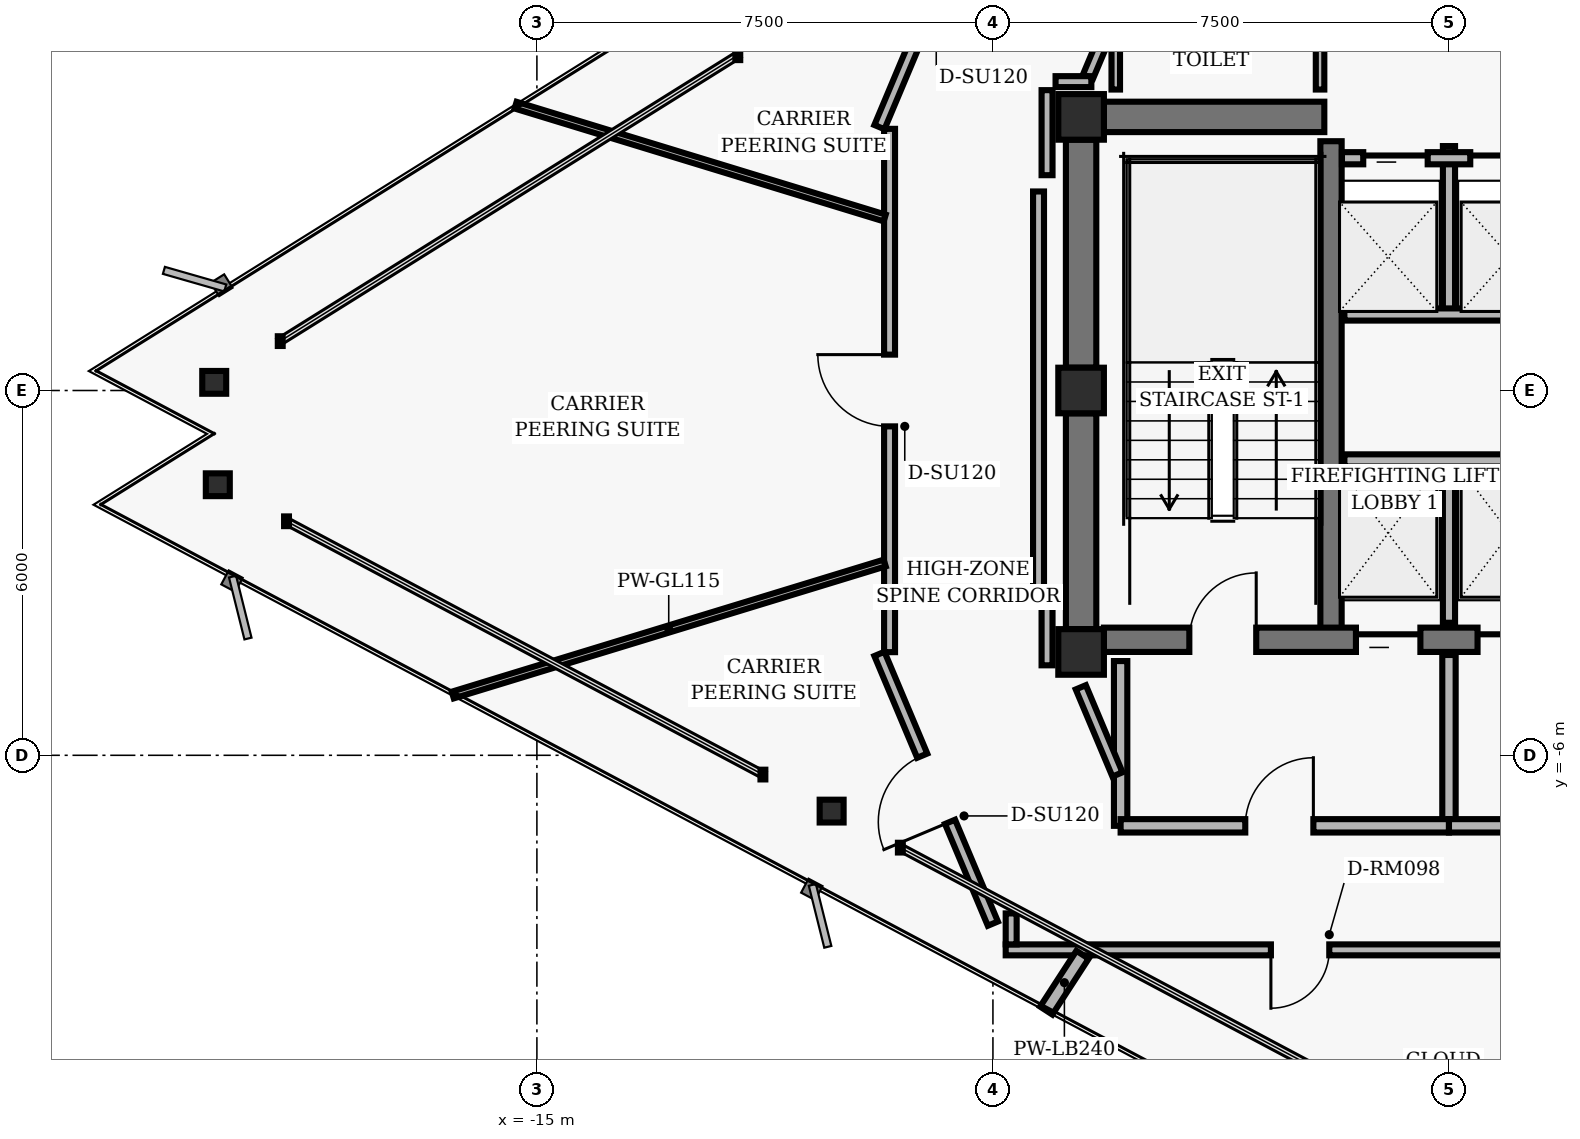
"""IFC4 building model, lengths in metres.
Left out: names, types, materials, properties, quantities, classifications, styles, units other than length and angle.
Written with IfcOpenShell. Run it as: python <this file> out.ifc"""

import sys

from ifc_helpers import new_model, si_unit, direction, frame, frame_2d, origin, origin_2d, place, context, subcontext, project, spatial, rectangle, hollow_rectangle, i_section, extrude, element, fill, save


model = new_model("IFC4")
c1 = context("Model", 3, precision=1e-05, world=origin(), true_north=direction((0.0, 1.0)))
c2 = subcontext(c1, "Body", "Model", "MODEL_VIEW")
j1 = project(units=[si_unit("LENGTHUNIT", "METRE"), si_unit("PLANEANGLEUNIT", "RADIAN")], contexts=[c1])
p1 = place(None, origin())
s1 = spatial("IfcSite", under=j1, at=p1, CompositionType="ELEMENT")
p2 = place(p1, origin())
s2 = spatial("IfcBuilding", under=s1, at=p2, CompositionType="ELEMENT")
p3 = place(p2, frame((0.0, 0.0, 211.84)))
s3 = spatial("IfcBuildingStorey", under=s2, at=p3, CompositionType="ELEMENT", Elevation=211.84)
for number, where, z_axis, x_axis in (
    (1, (-6.05, 4.5, 0.0), (0.0, 0.0, 1.0), (1.0, 0.0, 0.0)),
    (2, (-6.05, 0.0, 0.0), (0.0, 0.0, 1.0), (1.0, 0.0, 0.0)),
    (3, (-6.05, -4.3, 0.0), (0.0, 0.0, 1.0), (1.0, 0.0, 0.0)),
):
    element("IfcColumn", number, at=place(p3, frame(where, z_axis=z_axis, x_axis=x_axis)), inside=s3, PredefinedType="COLUMN", context=c2, shape_type="SweptSolid", body=[
        extrude(hollow_rectangle(XDim=0.75, YDim=0.75, WallThickness=0.05, InnerFilletRadius=0.02, OuterFilletRadius=0.04, at=origin_2d()), origin(), (0.0, 0.0, 1.0), 3.04),
    ])
p4 = place(p3, frame((-6.05, 0.375, 0.0), z_axis=(0.0, 0.0, 1.0), x_axis=(0.0, 1.0, 0.0)))
e4 = element("IfcWall", 4, at=p4, inside=s3, PredefinedType="SHEAR", context=c2, shape_type="SweptSolid", body=[
    extrude(rectangle(XDim=3.75, YDim=0.5, at=frame_2d((1.875, 0.0))), origin(), (0.0, 0.0, 1.0), 2.618),
])
p5 = place(p3, frame((-6.05, -3.925, 0.0), z_axis=(0.0, 0.0, 1.0), x_axis=(0.0, 1.0, 0.0)))
e5 = element("IfcWall", 5, at=p5, inside=s3, PredefinedType="SHEAR", context=c2, shape_type="SweptSolid", body=[
    extrude(rectangle(XDim=3.55, YDim=0.5, at=frame_2d((1.775, 0.0))), origin(), (0.0, 0.0, 1.0), 2.618),
])
p6 = place(p3, frame((-1.94, -4.1, 0.0), z_axis=(0.0, 0.0, 1.0), x_axis=(0.0, 1.0, 0.0)))
e6 = element("IfcWall", 6, at=p6, inside=s3, PredefinedType="SHEAR", context=c2, shape_type="SweptSolid", body=[
    extrude(rectangle(XDim=8.2, YDim=0.35, at=frame_2d((4.1, 0.0))), origin(), (0.0, 0.0, 1.0), 2.618),
])
p7 = place(p3, frame((-5.675, -4.1, 0.0), z_axis=(0.0, 0.0, 1.0), x_axis=(1.0, 0.0, 0.0)))
e7 = element("IfcWall", 7, at=p7, inside=s3, PredefinedType="SHEAR", context=c2, shape_type="SweptSolid", body=[
    extrude(rectangle(XDim=11.35, YDim=0.4, at=frame_2d((5.675, 0.0))), origin(), (0.0, 0.0, 1.0), 2.618),
])
p8 = place(p7, frame((1.405, 0.0, 0.0)))
e8 = element("IfcOpeningElement", 8, at=p8, cuts=e7, PredefinedType="OPENING", context=c2, shape_type="SweptSolid", body=[
    extrude(rectangle(XDim=1.1, YDim=2.04, at=frame_2d((0.55, 1.02))), frame((0.0, 0.21, 0.0), z_axis=(0.0, -1.0, 0.0), x_axis=(1.0, 0.0, 0.0)), (0.0, 0.0, 1.0), 0.42),
])
p9 = place(p7, frame((8.845, 0.0, 0.0)))
e9 = element("IfcOpeningElement", 9, at=p9, cuts=e7, PredefinedType="OPENING", context=c2, shape_type="SweptSolid", body=[
    extrude(rectangle(XDim=1.1, YDim=2.04, at=frame_2d((0.55, 1.02))), frame((0.0, 0.21, 0.0), z_axis=(0.0, -1.0, 0.0), x_axis=(1.0, 0.0, 0.0)), (0.0, 0.0, 1.0), 0.42),
])
p10 = place(p7, frame((4.145, 0.0, 0.0)))
e10 = element("IfcOpeningElement", 10, at=p10, cuts=e7, PredefinedType="OPENING", context=c2, shape_type="SweptSolid", body=[
    extrude(rectangle(XDim=1.06, YDim=2.04, at=frame_2d((0.53, 1.02))), frame((0.0, 0.21, 0.0), z_axis=(0.0, -1.0, 0.0), x_axis=(1.0, 0.0, 0.0)), (0.0, 0.0, 1.0), 0.42),
])
p11 = place(p7, frame((6.145, 0.0, 0.0)))
e11 = element("IfcOpeningElement", 11, at=p11, cuts=e7, PredefinedType="OPENING", context=c2, shape_type="SweptSolid", body=[
    extrude(rectangle(XDim=1.06, YDim=2.04, at=frame_2d((0.53, 1.02))), frame((0.0, 0.21, 0.0), z_axis=(0.0, -1.0, 0.0), x_axis=(1.0, 0.0, 0.0)), (0.0, 0.0, 1.0), 0.42),
])
p12 = place(p3, frame((-5.675, 4.5, 0.0), z_axis=(0.0, 0.0, 1.0), x_axis=(1.0, 0.0, 0.0)))
e12 = element("IfcWall", 12, at=p12, inside=s3, PredefinedType="SHEAR", context=c2, shape_type="SweptSolid", body=[
    extrude(rectangle(XDim=3.625, YDim=0.5, at=frame_2d((1.812, 0.0))), origin(), (0.0, 0.0, 1.0), 2.618),
])
for number, where, z_axis, x_axis in (
    (13, (-20.307, 0.134, 0.0), (0.0, 0.0, 1.0), (1.0, 0.0, 0.0)),
    (14, (-20.248, -1.55, 0.0), (0.0, 0.0, 1.0), (1.0, 0.0, 0.0)),
    (15, (-10.153, -6.918, 0.0), (0.0, 0.0, 1.0), (1.0, 0.0, 0.0)),
):
    element("IfcColumn", number, at=place(p3, frame(where, z_axis=z_axis, x_axis=x_axis)), inside=s3, PredefinedType="COLUMN", context=c2, shape_type="SweptSolid", body=[
        extrude(i_section(OverallWidth=0.394, OverallDepth=0.375, WebThickness=0.017, FlangeThickness=0.028, FilletRadius=0.016, at=origin_2d()), origin(), (0.0, 0.0, 1.0), 3.04),
    ])
p13 = place(p3, frame((0.0, -3.82, 0.0), z_axis=(0.0, 0.0, 1.0), x_axis=(0.0, 1.0, 0.0)))
e16 = element("IfcWall", 16, at=p13, inside=s3, PredefinedType="PARTITIONING", context=c2, shape_type="SweptSolid", body=[
    extrude(rectangle(XDim=2.67, YDim=0.2, at=frame_2d((1.335, 0.0))), origin(), (0.0, 0.0, 1.0), 2.593),
])
p14 = place(p3, frame((-1.72, -1.15, 0.0), z_axis=(0.0, 0.0, 1.0), x_axis=(1.0, 0.0, 0.0)))
e17 = element("IfcWall", 17, at=p14, inside=s3, PredefinedType="PARTITIONING", context=c2, shape_type="SweptSolid", body=[
    extrude(rectangle(XDim=3.44, YDim=0.2, at=frame_2d((1.72, 0.0))), origin(), (0.0, 0.0, 1.0), 2.593),
])
p15 = place(p3, frame((-5.4, -7.16, 0.0), z_axis=(0.0, 0.0, 1.0), x_axis=(0.0, 1.0, 0.0)))
e18 = element("IfcWall", 18, at=p15, inside=s3, PredefinedType="PARTITIONING", context=c2, shape_type="SweptSolid", body=[
    extrude(rectangle(XDim=2.71, YDim=0.22, at=frame_2d((1.355, 0.0))), origin(), (0.0, 0.0, 1.0), 2.593),
])
p16 = place(p3, frame((0.0, -7.16, 0.0), z_axis=(0.0, 0.0, 1.0), x_axis=(0.0, 1.0, 0.0)))
e19 = element("IfcWall", 19, at=p16, inside=s3, PredefinedType="PARTITIONING", context=c2, shape_type="SweptSolid", body=[
    extrude(rectangle(XDim=2.81, YDim=0.22, at=frame_2d((1.405, 0.0))), origin(), (0.0, 0.0, 1.0), 2.593),
])
p17 = place(p3, frame((-5.4, -7.16, 0.0), z_axis=(0.0, 0.0, 1.0), x_axis=(1.0, 0.0, 0.0)))
e20 = element("IfcWall", 20, at=p17, inside=s3, PredefinedType="PARTITIONING", context=c2, shape_type="SweptSolid", body=[
    extrude(rectangle(XDim=5.4, YDim=0.22, at=frame_2d((2.7, 0.0))), origin(), (0.0, 0.0, 1.0), 2.215),
])
p18 = place(p17, frame((2.05, 0.0, 0.0)))
e21 = element("IfcOpeningElement", 21, at=p18, cuts=e20, PredefinedType="OPENING", context=c2, shape_type="SweptSolid", body=[
    extrude(rectangle(XDim=1.12, YDim=2.02, at=frame_2d((0.56, 1.01))), frame((0.0, 0.12, 0.0), z_axis=(0.0, -1.0, 0.0), x_axis=(1.0, 0.0, 0.0)), (0.0, 0.0, 1.0), 0.24),
])
p19 = place(p3, frame((0.0, -7.16, 0.0), z_axis=(0.0, 0.0, 1.0), x_axis=(1.0, 0.0, 0.0)))
e22 = element("IfcWall", 22, at=p19, inside=s3, PredefinedType="PARTITIONING", context=c2, shape_type="SweptSolid", body=[
    extrude(rectangle(XDim=5.4, YDim=0.22, at=frame_2d((2.7, 0.0))), origin(), (0.0, 0.0, 1.0), 2.593),
])
p20 = place(p19, frame((2.05, 0.0, 0.0)))
e23 = element("IfcOpeningElement", 23, at=p20, cuts=e22, PredefinedType="OPENING", context=c2, shape_type="SweptSolid", body=[
    extrude(rectangle(XDim=1.12, YDim=2.02, at=frame_2d((0.56, 1.01))), frame((0.0, 0.12, 0.0), z_axis=(0.0, -1.0, 0.0), x_axis=(1.0, 0.0, 0.0)), (0.0, 0.0, 1.0), 0.24),
])
p21 = place(p3, frame((0.0, 1.25, 0.0), z_axis=(0.0, 0.0, 1.0), x_axis=(0.0, 1.0, 0.0)))
e24 = element("IfcWall", 24, at=p21, inside=s3, PredefinedType="PARTITIONING", context=c2, shape_type="SweptSolid", body=[
    extrude(rectangle(XDim=2.77, YDim=0.2, at=frame_2d((1.385, 0.0))), origin(), (0.0, 0.0, 1.0), 2.593),
])
p22 = place(p3, frame((-1.72, 1.25, 0.0), z_axis=(0.0, 0.0, 1.0), x_axis=(1.0, 0.0, 0.0)))
e25 = element("IfcWall", 25, at=p22, inside=s3, PredefinedType="PARTITIONING", context=c2, shape_type="SweptSolid", body=[
    extrude(rectangle(XDim=3.44, YDim=0.2, at=frame_2d((1.72, 0.0))), origin(), (0.0, 0.0, 1.0), 2.593),
])
p23 = place(p3, frame((-1.76, 3.82, 0.0), z_axis=(0.0, 0.0, 1.0), x_axis=(1.0, 0.0, 0.0)))
e26 = element("IfcWall", 26, at=p23, inside=s3, PredefinedType="PARTITIONING", context=c2, shape_type="SweptSolid", body=[
    extrude(rectangle(XDim=3.52, YDim=0.2, at=frame_2d((1.76, 0.0))), origin(), (0.0, 0.0, 1.0), 2.593),
])
p24 = place(p23, frame((0.35, 0.0, 0.0)))
e27 = element("IfcOpeningElement", 27, at=p24, cuts=e26, PredefinedType="OPENING", context=c2, shape_type="SweptSolid", body=[
    extrude(rectangle(XDim=1.06, YDim=2.04, at=frame_2d((0.53, 1.02))), frame((0.0, 0.11, 0.0), z_axis=(0.0, -1.0, 0.0), x_axis=(1.0, 0.0, 0.0)), (0.0, 0.0, 1.0), 0.22),
])
p25 = place(p23, frame((2.11, 0.0, 0.0)))
e28 = element("IfcOpeningElement", 28, at=p25, cuts=e26, PredefinedType="OPENING", context=c2, shape_type="SweptSolid", body=[
    extrude(rectangle(XDim=1.06, YDim=2.04, at=frame_2d((0.53, 1.02))), frame((0.0, 0.11, 0.0), z_axis=(0.0, -1.0, 0.0), x_axis=(1.0, 0.0, 0.0)), (0.0, 0.0, 1.0), 0.22),
])
for number, where, z_axis, x_axis in (
    (29, (-5.48, 4.95, 0.0), (0.0, 0.0, 1.0), (0.0, 1.0, 0.0)),
    (30, (-2.12, 4.95, 0.0), (0.0, 0.0, 1.0), (0.0, 1.0, 0.0)),
):
    element("IfcWall", number, at=place(p3, frame(where, z_axis=z_axis, x_axis=x_axis)), inside=s3, PredefinedType="PARTITIONING", context=c2, shape_type="SweptSolid", body=[
        extrude(rectangle(XDim=2.1, YDim=0.14, at=frame_2d((1.05, 0.0))), origin(), (0.0, 0.0, 1.0), 2.593),
    ])
p26 = place(p3, frame((-7.501, -8.769, 0.0), z_axis=(0.0, 0.0, 1.0), x_axis=(-0.387573945081, 0.921838617706, 0.0)))
e31 = element("IfcWall", 31, at=p26, inside=s3, PredefinedType="PARTITIONING", context=c2, shape_type="SweptSolid", body=[
    extrude(rectangle(XDim=4.813, YDim=0.18, at=frame_2d((2.407, 0.0))), origin(), (0.0, 0.0, 1.0), 2.593),
])
p27 = place(p26, frame((1.817, 0.0, 0.0)))
e32 = element("IfcOpeningElement", 32, at=p27, cuts=e31, PredefinedType="OPENING", context=c2, shape_type="SweptSolid", body=[
    extrude(rectangle(XDim=1.18, YDim=2.02, at=frame_2d((0.59, 1.01))), frame((0.0, 0.1, 0.0), z_axis=(0.0, -1.0, 0.0), x_axis=(1.0, 0.0, 0.0)), (0.0, 0.0, 1.0), 0.2),
])
p28 = place(p3, frame((-9.2, -4.303, 0.0), z_axis=(0.0, 0.0, 1.0), x_axis=(0.0, 1.0, 0.0)))
e33 = element("IfcWall", 33, at=p28, inside=s3, PredefinedType="PARTITIONING", context=c2, shape_type="SweptSolid", body=[
    extrude(rectangle(XDim=8.607, YDim=0.18, at=frame_2d((4.303, 0.0))), origin(), (0.0, 0.0, 1.0), 2.593),
])
p29 = place(p28, frame((3.713, 0.0, 0.0)))
e34 = element("IfcOpeningElement", 34, at=p29, cuts=e33, PredefinedType="OPENING", context=c2, shape_type="SweptSolid", body=[
    extrude(rectangle(XDim=1.18, YDim=2.02, at=frame_2d((0.59, 1.01))), frame((0.0, 0.1, 0.0), z_axis=(0.0, -1.0, 0.0), x_axis=(1.0, 0.0, 0.0)), (0.0, 0.0, 1.0), 0.2),
])
p30 = place(p3, frame((-9.367, 4.332, 0.0), z_axis=(0.0, 0.0, 1.0), x_axis=(0.387573945081, 0.921838617706, 0.0)))
e35 = element("IfcWall", 35, at=p30, inside=s3, PredefinedType="PARTITIONING", context=c2, shape_type="SweptSolid", body=[
    extrude(rectangle(XDim=4.813, YDim=0.18, at=frame_2d((2.407, 0.0))), origin(), (0.0, 0.0, 1.0), 2.593),
])
p31 = place(p30, frame((1.817, 0.0, 0.0)))
e36 = element("IfcOpeningElement", 36, at=p31, cuts=e35, PredefinedType="OPENING", context=c2, shape_type="SweptSolid", body=[
    extrude(rectangle(XDim=1.18, YDim=2.02, at=frame_2d((0.59, 1.01))), frame((0.0, 0.1, 0.0), z_axis=(0.0, -1.0, 0.0), x_axis=(1.0, 0.0, 0.0)), (0.0, 0.0, 1.0), 0.2),
])
p32 = place(p3, frame((-5.602, 5.958, 0.0), z_axis=(0.0, 0.0, 1.0), x_axis=(-0.387588639363, -0.921832439566, 0.0)))
e37 = element("IfcWall", 37, at=p32, inside=s3, PredefinedType="PARTITIONING", context=c2, shape_type="SweptSolid", body=[
    extrude(rectangle(XDim=0.862, YDim=0.18, at=frame_2d((0.431, 0.0))), origin(), (0.0, 0.0, 1.0), 2.593),
])
p33 = place(p3, frame((-5.881, 5.08, 0.0), z_axis=(0.0, 0.0, 1.0), x_axis=(-1.0, 0.0, 0.0)))
e38 = element("IfcWall", 38, at=p33, inside=s3, PredefinedType="PARTITIONING", context=c2, shape_type="SweptSolid", body=[
    extrude(rectangle(XDim=0.589, YDim=0.18, at=frame_2d((0.294, 0.0))), origin(), (0.0, 0.0, 1.0), 2.593),
])
p34 = place(p3, frame((-6.61, 4.94, 0.0), z_axis=(0.0, 0.0, 1.0), x_axis=(0.0, -1.0, 0.0)))
e39 = element("IfcWall", 39, at=p34, inside=s3, PredefinedType="PARTITIONING", context=c2, shape_type="SweptSolid", body=[
    extrude(rectangle(XDim=1.399, YDim=0.18, at=frame_2d((0.699, 0.0))), origin(), (0.0, 0.0, 1.0), 2.593),
])
p35 = place(p3, frame((-6.75, 3.273, 0.0), z_axis=(0.0, 0.0, 1.0), x_axis=(0.0, -1.0, 0.0)))
e40 = element("IfcWall", 40, at=p35, inside=s3, PredefinedType="PARTITIONING", context=c2, shape_type="SweptSolid", body=[
    extrude(rectangle(XDim=6.547, YDim=0.18, at=frame_2d((3.273, 0.0))), origin(), (0.0, 0.0, 1.0), 2.593),
])
p36 = place(p3, frame((-6.61, -3.541, 0.0), z_axis=(0.0, 0.0, 1.0), x_axis=(0.0, -1.0, 0.0)))
e41 = element("IfcWall", 41, at=p36, inside=s3, PredefinedType="PARTITIONING", context=c2, shape_type="SweptSolid", body=[
    extrude(rectangle(XDim=0.979, YDim=0.18, at=frame_2d((0.489, 0.0))), origin(), (0.0, 0.0, 1.0), 2.593),
])
p37 = place(p3, frame((-6.055, -4.882, 0.0), z_axis=(0.0, 0.0, 1.0), x_axis=(0.387579540458, -0.921836265189, 0.0)))
e42 = element("IfcWall", 42, at=p37, inside=s3, PredefinedType="PARTITIONING", context=c2, shape_type="SweptSolid", body=[
    extrude(rectangle(XDim=1.555, YDim=0.18, at=frame_2d((0.777, 0.0))), origin(), (0.0, 0.0, 1.0), 2.073),
])
p38 = place(p3, frame((6.01, -9.2, 0.0), z_axis=(0.0, 0.0, 1.0), x_axis=(-1.0, 0.0, 0.0)))
e43 = element("IfcWall", 43, at=p38, inside=s3, PredefinedType="PARTITIONING", context=c2, shape_type="SweptSolid", body=[
    extrude(rectangle(XDim=13.3, YDim=0.18, at=frame_2d((6.65, 0.0))), origin(), (0.0, 0.0, 1.0), 2.215),
])
p39 = place(p38, frame((7.979, 0.0, 0.0)))
e44 = element("IfcOpeningElement", 44, at=p39, cuts=e43, PredefinedType="OPENING", context=c2, shape_type="SweptSolid", body=[
    extrude(rectangle(XDim=0.96, YDim=2.02, at=frame_2d((0.48, 1.01))), frame((0.0, 0.1, 0.0), z_axis=(0.0, -1.0, 0.0), x_axis=(1.0, 0.0, 0.0)), (0.0, 0.0, 1.0), 0.2),
])
p40 = place(p38, frame((2.055, 0.0, 0.0)))
e45 = element("IfcOpeningElement", 45, at=p40, cuts=e43, PredefinedType="OPENING", context=c2, shape_type="SweptSolid", body=[
    extrude(rectangle(XDim=1.02, YDim=2.02, at=frame_2d((0.51, 1.01))), frame((0.0, 0.1, 0.0), z_axis=(0.0, -1.0, 0.0), x_axis=(1.0, 0.0, 0.0)), (0.0, 0.0, 1.0), 0.2),
])
p41 = place(p3, frame((-7.2, -9.11, 0.0), z_axis=(0.0, 0.0, 1.0), x_axis=(0.0, 1.0, 0.0)))
e46 = element("IfcWall", 46, at=p41, inside=s3, PredefinedType="PARTITIONING", context=c2, shape_type="SweptSolid", body=[
    extrude(rectangle(XDim=0.51, YDim=0.18, at=frame_2d((0.255, 0.0))), origin(), (0.0, 0.0, 1.0), 2.593),
])
p42 = place(p3, frame((-9.28, -2.837, 0.0), z_axis=(0.0, 0.0, 1.0), x_axis=(-0.956303337488, -0.292376344307, 0.0)))
e47 = element("IfcWall", 47, at=p42, inside=s3, PredefinedType="MOVABLE", context=c2, shape_type="SweptSolid", body=[
    extrude(rectangle(XDim=7.428, YDim=0.115, at=frame_2d((3.714, 0.0))), origin(), (0.0, 0.0, 1.0), 2.593),
])
p43 = place(p3, frame((-6.027, -9.28, 0.0), z_axis=(0.0, 0.0, 1.0), x_axis=(-0.544526030547, -0.838743943082, 0.0)))
e48 = element("IfcWall", 48, at=p43, inside=s3, PredefinedType="PARTITIONING", context=c2, shape_type="SweptSolid", body=[
    extrude(rectangle(XDim=1.095, YDim=0.24, at=frame_2d((0.548, 0.0))), origin(), (0.0, 0.0, 1.0), 2.593),
])
p44 = place(p3, frame((-9.28, 2.837, 0.0), z_axis=(0.0, 0.0, 1.0), x_axis=(-0.956301397149, 0.292382690682, 0.0)))
e49 = element("IfcWall", 49, at=p44, inside=s3, PredefinedType="MOVABLE", context=c2, shape_type="SweptSolid", body=[
    extrude(rectangle(XDim=6.348, YDim=0.115, at=frame_2d((3.174, 0.0))), origin(), (0.0, 0.0, 1.0), 2.593),
])
p45 = place(p8, origin())
e50 = element("IfcDoor", 50, at=p45, inside=s3, OperationType="SINGLE_SWING_RIGHT", PredefinedType="DOOR", context=c2, shape_type="SweptSolid", body=[
    extrude(rectangle(XDim=1.1, YDim=2.04, at=frame_2d((0.55, 1.02))), frame((0.0, 0.025, 0.0), z_axis=(0.0, -1.0, 0.0), x_axis=(1.0, 0.0, 0.0)), (0.0, 0.0, 1.0), 0.05),
])
fill(e8, e50)
p46 = place(p10, origin())
e51 = element("IfcDoor", 51, at=p46, inside=s3, OperationType="SLIDING_TO_LEFT", PredefinedType="DOOR", context=c2, shape_type="SweptSolid", body=[
    extrude(rectangle(XDim=1.06, YDim=2.04, at=frame_2d((0.53, 1.02))), frame((0.0, 0.025, 0.0), z_axis=(0.0, -1.0, 0.0), x_axis=(1.0, 0.0, 0.0)), (0.0, 0.0, 1.0), 0.05),
])
fill(e10, e51)
p47 = place(p11, origin())
e52 = element("IfcDoor", 52, at=p47, inside=s3, OperationType="SLIDING_TO_RIGHT", PredefinedType="DOOR", context=c2, shape_type="SweptSolid", body=[
    extrude(rectangle(XDim=1.06, YDim=2.04, at=frame_2d((0.53, 1.02))), frame((0.0, 0.025, 0.0), z_axis=(0.0, -1.0, 0.0), x_axis=(1.0, 0.0, 0.0)), (0.0, 0.0, 1.0), 0.05),
])
fill(e11, e52)
p48 = place(p18, origin())
e53 = element("IfcDoor", 53, at=p48, inside=s3, OperationType="SINGLE_SWING_RIGHT", PredefinedType="DOOR", context=c2, shape_type="SweptSolid", body=[
    extrude(rectangle(XDim=1.12, YDim=2.02, at=frame_2d((0.56, 1.01))), frame((0.0, 0.025, 0.0), z_axis=(0.0, -1.0, 0.0), x_axis=(1.0, 0.0, 0.0)), (0.0, 0.0, 1.0), 0.05),
])
fill(e21, e53)
p49 = place(p24, origin())
e54 = element("IfcDoor", 54, at=p49, inside=s3, OperationType="SLIDING_TO_LEFT", PredefinedType="DOOR", context=c2, shape_type="SweptSolid", body=[
    extrude(rectangle(XDim=1.06, YDim=2.04, at=frame_2d((0.53, 1.02))), frame((0.0, 0.025, 0.0), z_axis=(0.0, -1.0, 0.0), x_axis=(1.0, 0.0, 0.0)), (0.0, 0.0, 1.0), 0.05),
])
fill(e27, e54)
p50 = place(p25, origin())
e55 = element("IfcDoor", 55, at=p50, inside=s3, OperationType="SLIDING_TO_RIGHT", PredefinedType="DOOR", context=c2, shape_type="SweptSolid", body=[
    extrude(rectangle(XDim=1.06, YDim=2.04, at=frame_2d((0.53, 1.02))), frame((0.0, 0.025, 0.0), z_axis=(0.0, -1.0, 0.0), x_axis=(1.0, 0.0, 0.0)), (0.0, 0.0, 1.0), 0.05),
])
fill(e28, e55)
p51 = place(p29, origin())
e56 = element("IfcDoor", 56, at=p51, inside=s3, OperationType="SINGLE_SWING_RIGHT", PredefinedType="DOOR", context=c2, shape_type="SweptSolid", body=[
    extrude(rectangle(XDim=1.18, YDim=2.02, at=frame_2d((0.59, 1.01))), frame((0.0, 0.025, 0.0), z_axis=(0.0, -1.0, 0.0), x_axis=(1.0, 0.0, 0.0)), (0.0, 0.0, 1.0), 0.05),
])
fill(e34, e56)
p52 = place(p27, origin())
e57 = element("IfcDoor", 57, at=p52, inside=s3, OperationType="SINGLE_SWING_LEFT", PredefinedType="DOOR", context=c2, shape_type="SweptSolid", body=[
    extrude(rectangle(XDim=1.18, YDim=2.02, at=frame_2d((0.59, 1.01))), frame((0.0, 0.025, 0.0), z_axis=(0.0, -1.0, 0.0), x_axis=(1.0, 0.0, 0.0)), (0.0, 0.0, 1.0), 0.05),
])
fill(e32, e57)
p53 = place(p39, origin())
e58 = element("IfcDoor", 58, at=p53, inside=s3, OperationType="SINGLE_SWING_RIGHT", PredefinedType="DOOR", context=c2, shape_type="SweptSolid", body=[
    extrude(rectangle(XDim=0.96, YDim=2.02, at=frame_2d((0.48, 1.01))), frame((0.0, 0.025, 0.0), z_axis=(0.0, -1.0, 0.0), x_axis=(1.0, 0.0, 0.0)), (0.0, 0.0, 1.0), 0.05),
])
fill(e44, e58)
save(model, sys.argv[1])
